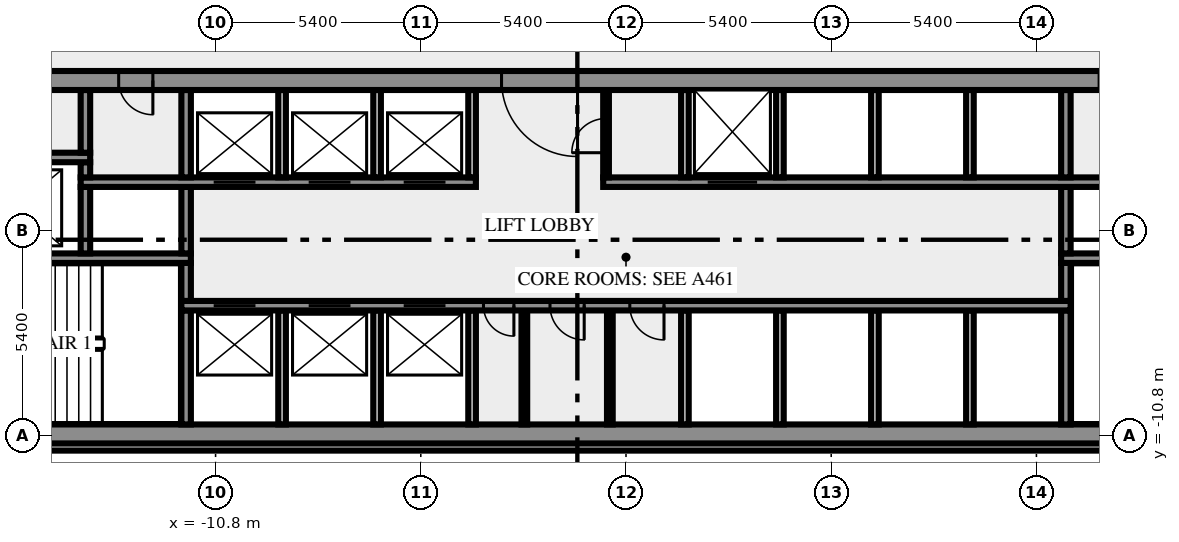
"""IFC4 building model, lengths in metres.
Left out: names, types, materials, properties, quantities, classifications, styles, units other than length and angle.
Written with IfcOpenShell. Run it as: python <this file> out.ifc"""

import sys

from ifc_helpers import new_model, si_unit, direction, frame, frame_2d, origin, place, context, subcontext, project, spatial, rectangle, extrude, element, fill, save


model = new_model("IFC4")
c1 = context("Model", 3, precision=1e-05, world=origin(), true_north=direction((0.0, 1.0)))
c2 = subcontext(c1, "Body", "Model", "MODEL_VIEW")
j1 = project(units=[si_unit("LENGTHUNIT", "METRE"), si_unit("PLANEANGLEUNIT", "RADIAN")], contexts=[c1])
p1 = place(None, origin())
s1 = spatial("IfcSite", under=j1, at=p1, CompositionType="ELEMENT")
p2 = place(p1, origin())
s2 = spatial("IfcBuilding", under=s1, at=p2, CompositionType="ELEMENT")
p3 = place(p2, frame((0.0, 0.0, 71.0)))
s3 = spatial("IfcBuildingStorey", under=s2, at=p3, CompositionType="ELEMENT", Elevation=71.0)
p4 = place(p3, frame((-17.444, -11.088, 0.0), z_axis=(0.0, 0.0, 1.0), x_axis=(1.0, 0.0, 0.0)))
e1 = element("IfcWall", 1, at=p4, inside=s3, PredefinedType="SOLIDWALL", context=c2, shape_type="SweptSolid", body=[
    extrude(rectangle(XDim=34.888, YDim=0.2, at=frame_2d((17.444, 0.0))), origin(), (0.0, 0.0, 1.0), 3.65),
])
p5 = place(p3, frame((-20.0, -10.75, 0.0), z_axis=(0.0, 0.0, 1.0), x_axis=(1.0, 0.0, 0.0)))
e2 = element("IfcWall", 2, at=p5, inside=s3, PredefinedType="SHEAR", context=c2, shape_type="SweptSolid", body=[
    extrude(rectangle(XDim=40.0, YDim=0.5, at=frame_2d((20.0, 0.0))), origin(), (0.0, 0.0, 1.0), 3.65),
])
p6 = place(p5, frame((0.8, 0.0, 1.0)))
e3 = element("IfcOpeningElement", 3, at=p6, cuts=e2, PredefinedType="OPENING", context=c2, shape_type="SweptSolid", body=[
    extrude(rectangle(XDim=1.2, YDim=1.2, at=frame_2d((0.6, 0.6))), frame((0.0, 0.26, 0.0), z_axis=(0.0, -1.0, 0.0), x_axis=(1.0, 0.0, 0.0)), (0.0, 0.0, 1.0), 0.52),
])
p7 = place(p5, frame((38.0, 0.0, 1.0)))
e4 = element("IfcOpeningElement", 4, at=p7, cuts=e2, PredefinedType="OPENING", context=c2, shape_type="SweptSolid", body=[
    extrude(rectangle(XDim=1.2, YDim=1.2, at=frame_2d((0.6, 0.6))), frame((0.0, 0.26, 0.0), z_axis=(0.0, -1.0, 0.0), x_axis=(1.0, 0.0, 0.0)), (0.0, 0.0, 1.0), 0.52),
])
p8 = place(p3, frame((-11.575, -10.5, 0.0), z_axis=(0.0, 0.0, 1.0), x_axis=(0.0, 1.0, 0.0)))
e5 = element("IfcWall", 5, at=p8, inside=s3, PredefinedType="SHEAR", context=c2, shape_type="SweptSolid", body=[
    extrude(rectangle(XDim=3.0, YDim=0.25, at=frame_2d((1.5, 0.0))), origin(), (0.0, 0.0, 1.0), 3.65),
])
for number, where, z_axis, x_axis in (
    (6, (-9.05, -10.5, 0.0), (0.0, 0.0, 1.0), (0.0, 1.0, 0.0)),
    (7, (-6.55, -10.5, 0.0), (0.0, 0.0, 1.0), (0.0, 1.0, 0.0)),
    (8, (-4.05, -10.5, 0.0), (0.0, 0.0, 1.0), (0.0, 1.0, 0.0)),
):
    element("IfcWall", number, at=place(p3, frame(where, z_axis=z_axis, x_axis=x_axis)), inside=s3, PredefinedType="SOLIDWALL", context=c2, shape_type="SweptSolid", body=[
        extrude(rectangle(XDim=3.0, YDim=0.2, at=frame_2d((1.5, 0.0))), origin(), (0.0, 0.0, 1.0), 3.65),
    ])
for number, where, z_axis, x_axis in (
    (9, (-2.675, -10.5, 0.0), (0.0, 0.0, 1.0), (0.0, 1.0, 0.0)),
    (10, (-0.425, -10.5, 0.0), (0.0, 0.0, 1.0), (0.0, 1.0, 0.0)),
):
    element("IfcWall", number, at=place(p3, frame(where, z_axis=z_axis, x_axis=x_axis)), inside=s3, PredefinedType="PARTITIONING", context=c2, shape_type="SweptSolid", body=[
        extrude(rectangle(XDim=3.0, YDim=0.15, at=frame_2d((1.5, 0.0))), origin(), (0.0, 0.0, 1.0), 3.65),
    ])
for number, where, z_axis, x_axis in (
    (11, (1.55, -10.5, 0.0), (0.0, 0.0, 1.0), (0.0, 1.0, 0.0)),
    (12, (4.05, -10.5, 0.0), (0.0, 0.0, 1.0), (0.0, 1.0, 0.0)),
    (13, (6.55, -10.5, 0.0), (0.0, 0.0, 1.0), (0.0, 1.0, 0.0)),
    (14, (9.05, -10.5, 0.0), (0.0, 0.0, 1.0), (0.0, 1.0, 0.0)),
):
    element("IfcWall", number, at=place(p3, frame(where, z_axis=z_axis, x_axis=x_axis)), inside=s3, PredefinedType="SOLIDWALL", context=c2, shape_type="SweptSolid", body=[
        extrude(rectangle(XDim=3.0, YDim=0.2, at=frame_2d((1.5, 0.0))), origin(), (0.0, 0.0, 1.0), 3.65),
    ])
p9 = place(p3, frame((11.575, -10.5, 0.0), z_axis=(0.0, 0.0, 1.0), x_axis=(0.0, 1.0, 0.0)))
e15 = element("IfcWall", 15, at=p9, inside=s3, PredefinedType="SHEAR", context=c2, shape_type="SweptSolid", body=[
    extrude(rectangle(XDim=3.0, YDim=0.25, at=frame_2d((1.5, 0.0))), origin(), (0.0, 0.0, 1.0), 3.65),
])
p10 = place(p3, frame((11.7, -7.375, 0.0), z_axis=(0.0, 0.0, 1.0), x_axis=(-1.0, 0.0, 0.0)))
e16 = element("IfcWall", 16, at=p10, inside=s3, PredefinedType="SHEAR", context=c2, shape_type="SweptSolid", body=[
    extrude(rectangle(XDim=23.4, YDim=0.25, at=frame_2d((11.7, 0.0))), origin(), (0.0, 0.0, 1.0), 3.65),
])
p11 = place(p10, frame((21.45, 0.0, 0.0)))
e17 = element("IfcOpeningElement", 17, at=p11, cuts=e16, PredefinedType="OPENING", context=c2, shape_type="SweptSolid", body=[
    extrude(rectangle(XDim=1.1, YDim=2.1, at=frame_2d((0.55, 1.05))), frame((0.0, 0.135, 0.0), z_axis=(0.0, -1.0, 0.0), x_axis=(1.0, 0.0, 0.0)), (0.0, 0.0, 1.0), 0.27),
])
p12 = place(p10, frame((18.95, 0.0, 0.0)))
e18 = element("IfcOpeningElement", 18, at=p12, cuts=e16, PredefinedType="OPENING", context=c2, shape_type="SweptSolid", body=[
    extrude(rectangle(XDim=1.1, YDim=2.1, at=frame_2d((0.55, 1.05))), frame((0.0, 0.135, 0.0), z_axis=(0.0, -1.0, 0.0), x_axis=(1.0, 0.0, 0.0)), (0.0, 0.0, 1.0), 0.27),
])
p13 = place(p10, frame((16.45, 0.0, 0.0)))
e19 = element("IfcOpeningElement", 19, at=p13, cuts=e16, PredefinedType="OPENING", context=c2, shape_type="SweptSolid", body=[
    extrude(rectangle(XDim=1.1, YDim=2.1, at=frame_2d((0.55, 1.05))), frame((0.0, 0.135, 0.0), z_axis=(0.0, -1.0, 0.0), x_axis=(1.0, 0.0, 0.0)), (0.0, 0.0, 1.0), 0.27),
])
p14 = place(p10, frame((14.65, 0.0, 0.0)))
e20 = element("IfcOpeningElement", 20, at=p14, cuts=e16, PredefinedType="OPENING", context=c2, shape_type="SweptSolid", body=[
    extrude(rectangle(XDim=0.8, YDim=2.1, at=frame_2d((0.4, 1.05))), frame((0.0, 0.135, 0.0), z_axis=(0.0, -1.0, 0.0), x_axis=(1.0, 0.0, 0.0)), (0.0, 0.0, 1.0), 0.27),
])
p15 = place(p10, frame((12.8, 0.0, 0.0)))
e21 = element("IfcOpeningElement", 21, at=p15, cuts=e16, PredefinedType="OPENING", context=c2, shape_type="SweptSolid", body=[
    extrude(rectangle(XDim=0.9, YDim=2.1, at=frame_2d((0.45, 1.05))), frame((0.0, 0.135, 0.0), z_axis=(0.0, -1.0, 0.0), x_axis=(1.0, 0.0, 0.0)), (0.0, 0.0, 1.0), 0.27),
])
p16 = place(p10, frame((10.7, 0.0, 0.0)))
e22 = element("IfcOpeningElement", 22, at=p16, cuts=e16, PredefinedType="OPENING", context=c2, shape_type="SweptSolid", body=[
    extrude(rectangle(XDim=0.9, YDim=2.1, at=frame_2d((0.45, 1.05))), frame((0.0, 0.135, 0.0), z_axis=(0.0, -1.0, 0.0), x_axis=(1.0, 0.0, 0.0)), (0.0, 0.0, 1.0), 0.27),
])
for number, where, z_axis, x_axis in (
    (23, (-11.575, -7.25, 0.0), (0.0, 0.0, 1.0), (0.0, 1.0, 0.0)),
    (24, (11.575, -7.25, 0.0), (0.0, 0.0, 1.0), (0.0, 1.0, 0.0)),
):
    element("IfcWall", number, at=place(p3, frame(where, z_axis=z_axis, x_axis=x_axis)), inside=s3, PredefinedType="SHEAR", context=c2, shape_type="SweptSolid", body=[
        extrude(rectangle(XDim=1.0, YDim=0.25, at=frame_2d((0.5, 0.0))), origin(), (0.0, 0.0, 1.0), 3.65),
    ])
p17 = place(p3, frame((-11.45, -6.125, 0.0), z_axis=(0.0, 0.0, 1.0), x_axis=(-1.0, 0.0, 0.0)))
e25 = element("IfcWall", 25, at=p17, inside=s3, PredefinedType="SHEAR", context=c2, shape_type="SweptSolid", body=[
    extrude(rectangle(XDim=8.05, YDim=0.25, at=frame_2d((4.025, 0.0))), origin(), (0.0, 0.0, 1.0), 3.65),
])
p18 = place(p17, frame((6.2, 0.0, 0.0)))
e26 = element("IfcOpeningElement", 26, at=p18, cuts=e25, PredefinedType="OPENING", context=c2, shape_type="SweptSolid", body=[
    extrude(rectangle(XDim=1.8, YDim=2.1, at=frame_2d((0.9, 1.05))), frame((0.0, 0.135, 0.0), z_axis=(0.0, -1.0, 0.0), x_axis=(1.0, 0.0, 0.0)), (0.0, 0.0, 1.0), 0.27),
])
p19 = place(p3, frame((19.5, -6.125, 0.0), z_axis=(0.0, 0.0, 1.0), x_axis=(-1.0, 0.0, 0.0)))
e27 = element("IfcWall", 27, at=p19, inside=s3, PredefinedType="SHEAR", context=c2, shape_type="SweptSolid", body=[
    extrude(rectangle(XDim=8.05, YDim=0.25, at=frame_2d((4.025, 0.0))), origin(), (0.0, 0.0, 1.0), 3.65),
])
p20 = place(p19, frame((0.05, 0.0, 0.0)))
e28 = element("IfcOpeningElement", 28, at=p20, cuts=e27, PredefinedType="OPENING", context=c2, shape_type="SweptSolid", body=[
    extrude(rectangle(XDim=1.8, YDim=2.1, at=frame_2d((0.9, 1.05))), frame((0.0, 0.135, 0.0), z_axis=(0.0, -1.0, 0.0), x_axis=(1.0, 0.0, 0.0)), (0.0, 0.0, 1.0), 0.27),
])
for number, where, z_axis, x_axis in (
    (29, (-14.225, -6.0, 0.0), (0.0, 0.0, 1.0), (0.0, 1.0, 0.0)),
    (30, (-11.575, -6.0, 0.0), (0.0, 0.0, 1.0), (0.0, 1.0, 0.0)),
    (31, (11.575, -6.0, 0.0), (0.0, 0.0, 1.0), (0.0, 1.0, 0.0)),
):
    element("IfcWall", number, at=place(p3, frame(where, z_axis=z_axis, x_axis=x_axis)), inside=s3, PredefinedType="SHEAR", context=c2, shape_type="SweptSolid", body=[
        extrude(rectangle(XDim=1.75, YDim=0.25, at=frame_2d((0.875, 0.0))), origin(), (0.0, 0.0, 1.0), 3.65),
    ])
p21 = place(p3, frame((-14.35, -4.125, 0.0), z_axis=(0.0, 0.0, 1.0), x_axis=(1.0, 0.0, 0.0)))
e32 = element("IfcWall", 32, at=p21, inside=s3, PredefinedType="SHEAR", context=c2, shape_type="SweptSolid", body=[
    extrude(rectangle(XDim=10.4, YDim=0.25, at=frame_2d((5.2, 0.0))), origin(), (0.0, 0.0, 1.0), 3.65),
])
p22 = place(p21, frame((3.5, 0.0, 0.0)))
e33 = element("IfcOpeningElement", 33, at=p22, cuts=e32, PredefinedType="OPENING", context=c2, shape_type="SweptSolid", body=[
    extrude(rectangle(XDim=1.1, YDim=2.1, at=frame_2d((0.55, 1.05))), frame((0.0, 0.135, 0.0), z_axis=(0.0, -1.0, 0.0), x_axis=(1.0, 0.0, 0.0)), (0.0, 0.0, 1.0), 0.27),
])
p23 = place(p21, frame((6.0, 0.0, 0.0)))
e34 = element("IfcOpeningElement", 34, at=p23, cuts=e32, PredefinedType="OPENING", context=c2, shape_type="SweptSolid", body=[
    extrude(rectangle(XDim=1.1, YDim=2.1, at=frame_2d((0.55, 1.05))), frame((0.0, 0.135, 0.0), z_axis=(0.0, -1.0, 0.0), x_axis=(1.0, 0.0, 0.0)), (0.0, 0.0, 1.0), 0.27),
])
p24 = place(p21, frame((8.5, 0.0, 0.0)))
e35 = element("IfcOpeningElement", 35, at=p24, cuts=e32, PredefinedType="OPENING", context=c2, shape_type="SweptSolid", body=[
    extrude(rectangle(XDim=1.1, YDim=2.1, at=frame_2d((0.55, 1.05))), frame((0.0, 0.135, 0.0), z_axis=(0.0, -1.0, 0.0), x_axis=(1.0, 0.0, 0.0)), (0.0, 0.0, 1.0), 0.27),
])
p25 = place(p3, frame((-0.6, -4.125, 0.0), z_axis=(0.0, 0.0, 1.0), x_axis=(1.0, 0.0, 0.0)))
e36 = element("IfcWall", 36, at=p25, inside=s3, PredefinedType="SHEAR", context=c2, shape_type="SweptSolid", body=[
    extrude(rectangle(XDim=14.95, YDim=0.25, at=frame_2d((7.475, 0.0))), origin(), (0.0, 0.0, 1.0), 3.65),
])
p26 = place(p25, frame((2.75, 0.0, 0.0)))
e37 = element("IfcOpeningElement", 37, at=p26, cuts=e36, PredefinedType="OPENING", context=c2, shape_type="SweptSolid", body=[
    extrude(rectangle(XDim=1.3, YDim=2.1, at=frame_2d((0.65, 1.05))), frame((0.0, 0.135, 0.0), z_axis=(0.0, -1.0, 0.0), x_axis=(1.0, 0.0, 0.0)), (0.0, 0.0, 1.0), 0.27),
])
p27 = place(p3, frame((-14.225, -4.0, 0.0), z_axis=(0.0, 0.0, 1.0), x_axis=(0.0, 1.0, 0.0)))
e38 = element("IfcWall", 38, at=p27, inside=s3, PredefinedType="SHEAR", context=c2, shape_type="SweptSolid", body=[
    extrude(rectangle(XDim=0.4, YDim=0.25, at=frame_2d((0.2, 0.0))), origin(), (0.0, 0.0, 1.0), 3.65),
])
p28 = place(p3, frame((-11.575, -4.0, 0.0), z_axis=(0.0, 0.0, 1.0), x_axis=(0.0, 1.0, 0.0)))
e39 = element("IfcWall", 39, at=p28, inside=s3, PredefinedType="SHEAR", context=c2, shape_type="SweptSolid", body=[
    extrude(rectangle(XDim=2.3, YDim=0.25, at=frame_2d((1.15, 0.0))), origin(), (0.0, 0.0, 1.0), 3.65),
])
for number, where, z_axis, x_axis in (
    (40, (-9.05, -4.0, 0.0), (0.0, 0.0, 1.0), (0.0, 1.0, 0.0)),
    (41, (-6.55, -4.0, 0.0), (0.0, 0.0, 1.0), (0.0, 1.0, 0.0)),
    (42, (-4.05, -4.0, 0.0), (0.0, 0.0, 1.0), (0.0, 1.0, 0.0)),
):
    element("IfcWall", number, at=place(p3, frame(where, z_axis=z_axis, x_axis=x_axis)), inside=s3, PredefinedType="SOLIDWALL", context=c2, shape_type="SweptSolid", body=[
        extrude(rectangle(XDim=2.3, YDim=0.2, at=frame_2d((1.15, 0.0))), origin(), (0.0, 0.0, 1.0), 3.65),
    ])
p29 = place(p3, frame((-0.525, -4.0, 0.0), z_axis=(0.0, 0.0, 1.0), x_axis=(0.0, 1.0, 0.0)))
e43 = element("IfcWall", 43, at=p29, inside=s3, PredefinedType="PARTITIONING", context=c2, shape_type="SweptSolid", body=[
    extrude(rectangle(XDim=2.3, YDim=0.15, at=frame_2d((1.15, 0.0))), origin(), (0.0, 0.0, 1.0), 3.65),
])
p30 = place(p29, frame((0.65, 0.0, 0.0)))
e44 = element("IfcOpeningElement", 44, at=p30, cuts=e43, PredefinedType="OPENING", context=c2, shape_type="SweptSolid", body=[
    extrude(rectangle(XDim=0.9, YDim=2.1, at=frame_2d((0.45, 1.05))), frame((0.0, 0.085, 0.0), z_axis=(0.0, -1.0, 0.0), x_axis=(1.0, 0.0, 0.0)), (0.0, 0.0, 1.0), 0.17),
])
for number, where, z_axis, x_axis in (
    (45, (1.55, -4.0, 0.0), (0.0, 0.0, 1.0), (0.0, 1.0, 0.0)),
    (46, (4.05, -4.0, 0.0), (0.0, 0.0, 1.0), (0.0, 1.0, 0.0)),
    (47, (6.55, -4.0, 0.0), (0.0, 0.0, 1.0), (0.0, 1.0, 0.0)),
    (48, (9.05, -4.0, 0.0), (0.0, 0.0, 1.0), (0.0, 1.0, 0.0)),
):
    element("IfcWall", number, at=place(p3, frame(where, z_axis=z_axis, x_axis=x_axis)), inside=s3, PredefinedType="SOLIDWALL", context=c2, shape_type="SweptSolid", body=[
        extrude(rectangle(XDim=2.3, YDim=0.2, at=frame_2d((1.15, 0.0))), origin(), (0.0, 0.0, 1.0), 3.65),
    ])
p31 = place(p3, frame((11.575, -4.0, 0.0), z_axis=(0.0, 0.0, 1.0), x_axis=(0.0, 1.0, 0.0)))
e49 = element("IfcWall", 49, at=p31, inside=s3, PredefinedType="SHEAR", context=c2, shape_type="SweptSolid", body=[
    extrude(rectangle(XDim=2.3, YDim=0.25, at=frame_2d((1.15, 0.0))), origin(), (0.0, 0.0, 1.0), 3.65),
])
p32 = place(p3, frame((-17.35, -3.475, 0.0), z_axis=(0.0, 0.0, 1.0), x_axis=(1.0, 0.0, 0.0)))
e50 = element("IfcWall", 50, at=p32, inside=s3, PredefinedType="SHEAR", context=c2, shape_type="SweptSolid", body=[
    extrude(rectangle(XDim=3.25, YDim=0.25, at=frame_2d((1.625, 0.0))), origin(), (0.0, 0.0, 1.0), 3.65),
])
p33 = place(p3, frame((-14.225, -3.35, 0.0), z_axis=(0.0, 0.0, 1.0), x_axis=(0.0, 1.0, 0.0)))
e51 = element("IfcWall", 51, at=p33, inside=s3, PredefinedType="SHEAR", context=c2, shape_type="SweptSolid", body=[
    extrude(rectangle(XDim=1.65, YDim=0.25, at=frame_2d((0.825, 0.0))), origin(), (0.0, 0.0, 1.0), 3.65),
])
p34 = place(p3, frame((20.49, -1.45, 0.0), z_axis=(0.0, 0.0, 1.0), x_axis=(-1.0, 0.0, 0.0)))
e52 = element("IfcWall", 52, at=p34, inside=s3, PredefinedType="SHEAR", context=c2, shape_type="SweptSolid", body=[
    extrude(rectangle(XDim=40.98, YDim=0.5, at=frame_2d((20.49, 0.0))), origin(), (0.0, 0.0, 1.0), 3.65),
])
p35 = place(p34, frame((38.14, 0.0, 0.0)))
e53 = element("IfcOpeningElement", 53, at=p35, cuts=e52, PredefinedType="OPENING", context=c2, shape_type="SweptSolid", body=[
    extrude(rectangle(XDim=1.8, YDim=2.1, at=frame_2d((0.9, 1.05))), frame((0.0, 0.26, 0.0), z_axis=(0.0, -1.0, 0.0), x_axis=(1.0, 0.0, 0.0)), (0.0, 0.0, 1.0), 0.52),
])
p36 = place(p34, frame((35.89, 0.0, 0.0)))
e54 = element("IfcOpeningElement", 54, at=p36, cuts=e52, PredefinedType="OPENING", context=c2, shape_type="SweptSolid", body=[
    extrude(rectangle(XDim=0.9, YDim=2.1, at=frame_2d((0.45, 1.05))), frame((0.0, 0.26, 0.0), z_axis=(0.0, -1.0, 0.0), x_axis=(1.0, 0.0, 0.0)), (0.0, 0.0, 1.0), 0.52),
])
p37 = place(p34, frame((32.94, 0.0, 0.0)))
e55 = element("IfcOpeningElement", 55, at=p37, cuts=e52, PredefinedType="OPENING", context=c2, shape_type="SweptSolid", body=[
    extrude(rectangle(XDim=0.9, YDim=2.1, at=frame_2d((0.45, 1.05))), frame((0.0, 0.26, 0.0), z_axis=(0.0, -1.0, 0.0), x_axis=(1.0, 0.0, 0.0)), (0.0, 0.0, 1.0), 0.52),
])
p38 = place(p34, frame((21.765, 0.0, 0.0)))
e56 = element("IfcOpeningElement", 56, at=p38, cuts=e52, PredefinedType="OPENING", context=c2, shape_type="SweptSolid", body=[
    extrude(rectangle(XDim=2.0, YDim=2.1, at=frame_2d((1.0, 1.05))), frame((0.0, 0.26, 0.0), z_axis=(0.0, -1.0, 0.0), x_axis=(1.0, 0.0, 0.0)), (0.0, 0.0, 1.0), 0.52),
])
p39 = place(p34, frame((7.14, 0.0, 0.0)))
e57 = element("IfcOpeningElement", 57, at=p39, cuts=e52, PredefinedType="OPENING", context=c2, shape_type="SweptSolid", body=[
    extrude(rectangle(XDim=0.9, YDim=2.1, at=frame_2d((0.45, 1.05))), frame((0.0, 0.26, 0.0), z_axis=(0.0, -1.0, 0.0), x_axis=(1.0, 0.0, 0.0)), (0.0, 0.0, 1.0), 0.52),
])
p40 = place(p34, frame((5.028, 0.0, 0.0)))
e58 = element("IfcOpeningElement", 58, at=p40, cuts=e52, PredefinedType="OPENING", context=c2, shape_type="SweptSolid", body=[
    extrude(rectangle(XDim=0.8, YDim=2.1, at=frame_2d((0.4, 1.05))), frame((0.0, 0.26, 0.0), z_axis=(0.0, -1.0, 0.0), x_axis=(1.0, 0.0, 0.0)), (0.0, 0.0, 1.0), 0.52),
])
p41 = place(p34, frame((3.452, 0.0, 0.0)))
e59 = element("IfcOpeningElement", 59, at=p41, cuts=e52, PredefinedType="OPENING", context=c2, shape_type="SweptSolid", body=[
    extrude(rectangle(XDim=0.8, YDim=2.1, at=frame_2d((0.4, 1.05))), frame((0.0, 0.26, 0.0), z_axis=(0.0, -1.0, 0.0), x_axis=(1.0, 0.0, 0.0)), (0.0, 0.0, 1.0), 0.52),
])
p42 = place(p34, frame((1.04, 0.0, 0.0)))
e60 = element("IfcOpeningElement", 60, at=p42, cuts=e52, PredefinedType="OPENING", context=c2, shape_type="SweptSolid", body=[
    extrude(rectangle(XDim=1.8, YDim=2.1, at=frame_2d((0.9, 1.05))), frame((0.0, 0.26, 0.0), z_axis=(0.0, -1.0, 0.0), x_axis=(1.0, 0.0, 0.0)), (0.0, 0.0, 1.0), 0.52),
])
p43 = place(p11, origin())
e61 = element("IfcDoor", 61, at=p43, inside=s3, OperationType="DOUBLE_DOOR_SLIDING", PredefinedType="DOOR", context=c2, shape_type="SweptSolid", body=[
    extrude(rectangle(XDim=1.1, YDim=2.1, at=frame_2d((0.55, 1.05))), frame((0.0, 0.025, 0.0), z_axis=(0.0, -1.0, 0.0), x_axis=(1.0, 0.0, 0.0)), (0.0, 0.0, 1.0), 0.05),
])
fill(e17, e61)
p44 = place(p12, origin())
e62 = element("IfcDoor", 62, at=p44, inside=s3, OperationType="DOUBLE_DOOR_SLIDING", PredefinedType="DOOR", context=c2, shape_type="SweptSolid", body=[
    extrude(rectangle(XDim=1.1, YDim=2.1, at=frame_2d((0.55, 1.05))), frame((0.0, 0.025, 0.0), z_axis=(0.0, -1.0, 0.0), x_axis=(1.0, 0.0, 0.0)), (0.0, 0.0, 1.0), 0.05),
])
fill(e18, e62)
p45 = place(p13, origin())
e63 = element("IfcDoor", 63, at=p45, inside=s3, OperationType="DOUBLE_DOOR_SLIDING", PredefinedType="DOOR", context=c2, shape_type="SweptSolid", body=[
    extrude(rectangle(XDim=1.1, YDim=2.1, at=frame_2d((0.55, 1.05))), frame((0.0, 0.025, 0.0), z_axis=(0.0, -1.0, 0.0), x_axis=(1.0, 0.0, 0.0)), (0.0, 0.0, 1.0), 0.05),
])
fill(e19, e63)
p46 = place(p14, origin())
e64 = element("IfcDoor", 64, at=p46, inside=s3, OperationType="SINGLE_SWING_RIGHT", PredefinedType="DOOR", context=c2, shape_type="SweptSolid", body=[
    extrude(rectangle(XDim=0.8, YDim=2.1, at=frame_2d((0.4, 1.05))), frame((0.0, 0.025, 0.0), z_axis=(0.0, -1.0, 0.0), x_axis=(1.0, 0.0, 0.0)), (0.0, 0.0, 1.0), 0.05),
])
fill(e20, e64)
p47 = place(p15, origin())
e65 = element("IfcDoor", 65, at=p47, inside=s3, OperationType="SINGLE_SWING_RIGHT", PredefinedType="DOOR", context=c2, shape_type="SweptSolid", body=[
    extrude(rectangle(XDim=0.9, YDim=2.1, at=frame_2d((0.45, 1.05))), frame((0.0, 0.025, 0.0), z_axis=(0.0, -1.0, 0.0), x_axis=(1.0, 0.0, 0.0)), (0.0, 0.0, 1.0), 0.05),
])
fill(e21, e65)
p48 = place(p16, origin())
e66 = element("IfcDoor", 66, at=p48, inside=s3, OperationType="SINGLE_SWING_LEFT", PredefinedType="DOOR", context=c2, shape_type="SweptSolid", body=[
    extrude(rectangle(XDim=0.9, YDim=2.1, at=frame_2d((0.45, 1.05))), frame((0.0, 0.025, 0.0), z_axis=(0.0, -1.0, 0.0), x_axis=(1.0, 0.0, 0.0)), (0.0, 0.0, 1.0), 0.05),
])
fill(e22, e66)
p49 = place(p22, origin())
e67 = element("IfcDoor", 67, at=p49, inside=s3, OperationType="DOUBLE_DOOR_SLIDING", PredefinedType="DOOR", context=c2, shape_type="SweptSolid", body=[
    extrude(rectangle(XDim=1.1, YDim=2.1, at=frame_2d((0.55, 1.05))), frame((0.0, 0.025, 0.0), z_axis=(0.0, -1.0, 0.0), x_axis=(1.0, 0.0, 0.0)), (0.0, 0.0, 1.0), 0.05),
])
fill(e33, e67)
p50 = place(p23, origin())
e68 = element("IfcDoor", 68, at=p50, inside=s3, OperationType="DOUBLE_DOOR_SLIDING", PredefinedType="DOOR", context=c2, shape_type="SweptSolid", body=[
    extrude(rectangle(XDim=1.1, YDim=2.1, at=frame_2d((0.55, 1.05))), frame((0.0, 0.025, 0.0), z_axis=(0.0, -1.0, 0.0), x_axis=(1.0, 0.0, 0.0)), (0.0, 0.0, 1.0), 0.05),
])
fill(e34, e68)
p51 = place(p24, origin())
e69 = element("IfcDoor", 69, at=p51, inside=s3, OperationType="DOUBLE_DOOR_SLIDING", PredefinedType="DOOR", context=c2, shape_type="SweptSolid", body=[
    extrude(rectangle(XDim=1.1, YDim=2.1, at=frame_2d((0.55, 1.05))), frame((0.0, 0.025, 0.0), z_axis=(0.0, -1.0, 0.0), x_axis=(1.0, 0.0, 0.0)), (0.0, 0.0, 1.0), 0.05),
])
fill(e35, e69)
p52 = place(p26, origin())
e70 = element("IfcDoor", 70, at=p52, inside=s3, OperationType="DOUBLE_DOOR_SLIDING", PredefinedType="DOOR", context=c2, shape_type="SweptSolid", body=[
    extrude(rectangle(XDim=1.3, YDim=2.1, at=frame_2d((0.65, 1.05))), frame((0.0, 0.025, 0.0), z_axis=(0.0, -1.0, 0.0), x_axis=(1.0, 0.0, 0.0)), (0.0, 0.0, 1.0), 0.05),
])
fill(e37, e70)
p53 = place(p30, origin())
e71 = element("IfcDoor", 71, at=p53, inside=s3, OperationType="SINGLE_SWING_LEFT", PredefinedType="DOOR", context=c2, shape_type="SweptSolid", body=[
    extrude(rectangle(XDim=0.9, YDim=2.1, at=frame_2d((0.45, 1.05))), frame((0.0, 0.025, 0.0), z_axis=(0.0, -1.0, 0.0), x_axis=(1.0, 0.0, 0.0)), (0.0, 0.0, 1.0), 0.05),
])
fill(e44, e71)
p54 = place(p37, origin())
e72 = element("IfcDoor", 72, at=p54, inside=s3, OperationType="SINGLE_SWING_RIGHT", PredefinedType="DOOR", context=c2, shape_type="SweptSolid", body=[
    extrude(rectangle(XDim=0.9, YDim=2.1, at=frame_2d((0.45, 1.05))), frame((0.0, 0.025, 0.0), z_axis=(0.0, -1.0, 0.0), x_axis=(1.0, 0.0, 0.0)), (0.0, 0.0, 1.0), 0.05),
])
fill(e55, e72)
p55 = place(p38, origin())
e73 = element("IfcDoor", 73, at=p55, inside=s3, OperationType="DOUBLE_DOOR_SINGLE_SWING", PredefinedType="DOOR", context=c2, shape_type="SweptSolid", body=[
    extrude(rectangle(XDim=2.0, YDim=2.1, at=frame_2d((1.0, 1.05))), frame((0.0, 0.025, 0.0), z_axis=(0.0, -1.0, 0.0), x_axis=(1.0, 0.0, 0.0)), (0.0, 0.0, 1.0), 0.05),
])
fill(e56, e73)
save(model, sys.argv[1])
